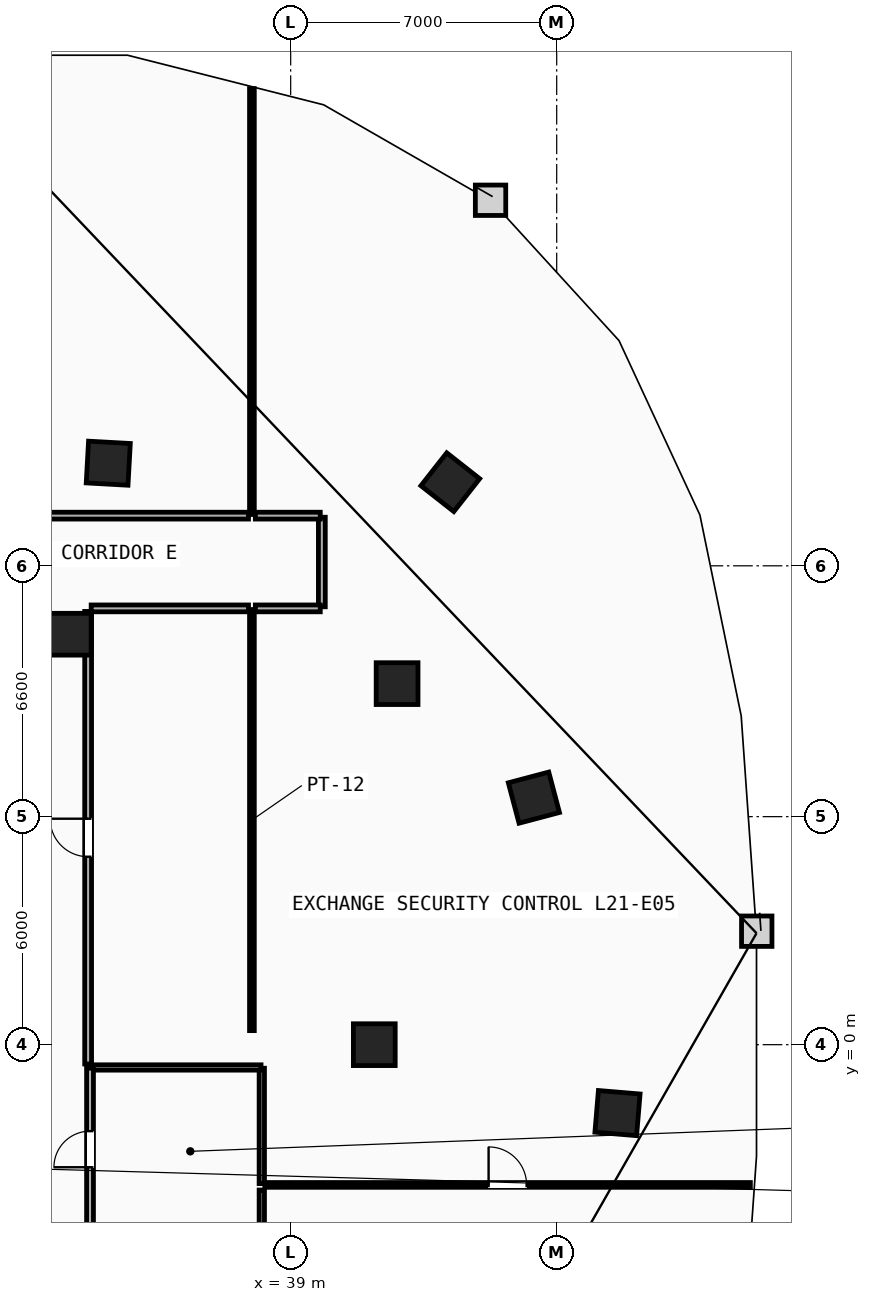
"""IFC4 building model, lengths in metres.
Left out: names, types, materials, properties, quantities, classifications, styles, units other than length and angle.
Written with IfcOpenShell. Run it as: python <this file> out.ifc"""

import sys

from ifc_helpers import new_model, si_unit, direction, frame, frame_2d, origin, origin_2d, place, context, subcontext, project, spatial, rectangle, extrude, element, fill, save


model = new_model("IFC4")
c1 = context("Model", 3, precision=1e-05, world=origin(), true_north=direction((0.0, 1.0)))
c2 = subcontext(c1, "Body", "Model", "MODEL_VIEW")
j1 = project(units=[si_unit("LENGTHUNIT", "METRE"), si_unit("PLANEANGLEUNIT", "RADIAN")], contexts=[c1])
p1 = place(None, origin())
s1 = spatial("IfcSite", under=j1, at=p1, CompositionType="ELEMENT")
p2 = place(p1, origin())
s2 = spatial("IfcBuilding", under=s1, at=p2, CompositionType="ELEMENT")
p3 = place(p2, frame((0.0, 0.0, 85.4)))
s3 = spatial("IfcBuildingStorey", under=s2, at=p3, CompositionType="ELEMENT", Elevation=85.4)
for number, where, z_axis, x_axis in (
    (1, (41.2, 0.0, 0.0), (0.0, 0.0, 1.0), (1.0, 0.0, 0.0)),
    (2, (41.8, 9.5, 0.0), (0.0, 0.0, 1.0), (1.0, 0.0, 0.0)),
    (3, (33.2, 10.8, 0.0), (0.0, 0.0, 1.0), (1.0, 0.0, 0.0)),
    (4, (47.6, -1.8, 0.0), (0.0, 0.0, 1.0), (0.084, 0.997, 0.0)),
    (5, (45.4, 6.5, 0.0), (0.0, 0.0, 1.0), (-0.256, 0.967, 0.0)),
    (6, (43.2, 14.8, 0.0), (0.0, 0.0, 1.0), (-0.786, 0.618, 0.0)),
    (7, (34.2, 15.3, 0.0), (0.0, 0.0, 1.0), (-0.998, 0.055, 0.0)),
):
    element("IfcColumn", number, at=place(p3, frame(where, z_axis=z_axis, x_axis=x_axis)), inside=s3, PredefinedType="COLUMN", context=c2, shape_type="SweptSolid", body=[
        extrude(rectangle(XDim=1.1, YDim=1.1, at=origin_2d()), origin(), (0.0, 0.0, 1.0), 3.6),
    ])
p4 = place(p3, frame((38.24, -4.895, 0.0), z_axis=(0.0, 0.0, 1.0), x_axis=(0.0, 1.0, 0.0)))
e8 = element("IfcWall", 8, at=p4, inside=s3, PredefinedType="PARTITIONING", context=c2, shape_type="SweptSolid", body=[
    extrude(rectangle(XDim=1.07, YDim=0.14, at=frame_2d((0.535, 0.0))), origin(), (0.0, 0.0, 1.0), 3.3),
])
p5 = place(p3, frame((38.24, -3.655, 0.0), z_axis=(0.0, 0.0, 1.0), x_axis=(0.0, 1.0, 0.0)))
e9 = element("IfcWall", 9, at=p5, inside=s3, PredefinedType="PARTITIONING", context=c2, shape_type="SweptSolid", body=[
    extrude(rectangle(XDim=3.035, YDim=0.14, at=frame_2d((1.518, 0.0))), origin(), (0.0, 0.0, 1.0), 3.3),
])
p6 = place(p3, frame((33.74, -0.6, 0.0), z_axis=(0.0, 0.0, 1.0), x_axis=(1.0, 0.0, 0.0)))
e10 = element("IfcWall", 10, at=p6, inside=s3, PredefinedType="PARTITIONING", context=c2, shape_type="SweptSolid", body=[
    extrude(rectangle(XDim=4.48, YDim=0.14, at=frame_2d((2.24, 0.0))), origin(), (0.0, 0.0, 1.0), 3.3),
])
p7 = place(p3, frame((33.72, -4.88, 0.0), z_axis=(0.0, 0.0, 1.0), x_axis=(0.0, 1.0, 0.0)))
e11 = element("IfcWall", 11, at=p7, inside=s3, PredefinedType="PARTITIONING", context=c2, shape_type="SweptSolid", body=[
    extrude(rectangle(XDim=4.26, YDim=0.18, at=frame_2d((2.13, 0.0))), origin(), (0.0, 0.0, 1.0), 3.3),
])
p8 = place(p7, frame((1.655, 0.0, 0.0)))
e12 = element("IfcOpeningElement", 12, at=p8, cuts=e11, PredefinedType="OPENING", context=c2, shape_type="SweptSolid", body=[
    extrude(rectangle(XDim=0.95, YDim=2.1, at=frame_2d((0.475, 1.05))), frame((0.0, 0.1, 0.0), z_axis=(0.0, -1.0, 0.0), x_axis=(1.0, 0.0, 0.0)), (0.0, 0.0, 1.0), 0.2),
])
p9 = place(p3, frame((37.98, 0.37, 0.0), z_axis=(0.0, 0.0, 1.0), x_axis=(0.0, 1.0, 0.0)))
e13 = element("IfcWall", 13, at=p9, inside=s3, PredefinedType="PARTITIONING", context=c2, shape_type="SweptSolid", body=[
    extrude(rectangle(XDim=11.08, YDim=0.125, at=frame_2d((5.54, 0.0))), origin(), (0.0, 0.0, 1.0), 3.3),
])
p10 = place(p3, frame((37.98, 13.95, 0.0), z_axis=(0.0, 0.0, 1.0), x_axis=(0.0, 1.0, 0.0)))
e14 = element("IfcWall", 14, at=p10, inside=s3, PredefinedType="PARTITIONING", context=c2, shape_type="SweptSolid", body=[
    extrude(rectangle(XDim=11.207, YDim=0.125, at=frame_2d((5.603, 0.0))), origin(), (0.0, 0.0, 1.0), 3.3),
])
p11 = place(p3, frame((37.89, 13.92, 0.0), z_axis=(0.0, 0.0, 1.0), x_axis=(-1.0, 0.0, 0.0)))
e15 = element("IfcWall", 15, at=p11, inside=s3, PredefinedType="PARTITIONING", context=c2, shape_type="SweptSolid", body=[
    extrude(rectangle(XDim=12.668, YDim=0.18, at=frame_2d((6.334, 0.0))), origin(), (0.0, 0.0, 1.0), 3.3),
])
p12 = place(p3, frame((33.67, -0.509, 0.0), z_axis=(0.0, 0.0, 1.0), x_axis=(0.0, 1.0, 0.0)))
e16 = element("IfcWall", 16, at=p12, inside=s3, PredefinedType="PARTITIONING", context=c2, shape_type="SweptSolid", body=[
    extrude(rectangle(XDim=11.908, YDim=0.18, at=frame_2d((5.954, 0.0))), origin(), (0.0, 0.0, 1.0), 3.3),
])
p13 = place(p12, frame((5.454, 0.0, 0.0)))
e17 = element("IfcOpeningElement", 17, at=p13, cuts=e16, PredefinedType="OPENING", context=c2, shape_type="SweptSolid", body=[
    extrude(rectangle(XDim=1.0, YDim=2.15, at=frame_2d((0.5, 1.075))), frame((0.0, 0.1, 0.0), z_axis=(0.0, -1.0, 0.0), x_axis=(1.0, 0.0, 0.0)), (0.0, 0.0, 1.0), 0.2),
])
p14 = place(p3, frame((33.75, 11.48, 0.0), z_axis=(0.0, 0.0, 1.0), x_axis=(1.0, 0.0, 0.0)))
e18 = element("IfcWall", 18, at=p14, inside=s3, PredefinedType="PARTITIONING", context=c2, shape_type="SweptSolid", body=[
    extrude(rectangle(XDim=4.14, YDim=0.18, at=frame_2d((2.07, 0.0))), origin(), (0.0, 0.0, 1.0), 3.3),
])
p15 = place(p3, frame((39.82, 11.521, 0.0), z_axis=(0.0, 0.0, 1.0), x_axis=(0.0, 1.0, 0.0)))
e19 = element("IfcWall", 19, at=p15, inside=s3, PredefinedType="PARTITIONING", context=c2, shape_type="SweptSolid", body=[
    extrude(rectangle(XDim=2.357, YDim=0.18, at=frame_2d((1.178, 0.0))), origin(), (0.0, 0.0, 1.0), 3.3),
])
for number, where, z_axis, x_axis in (
    (20, (38.07, 11.48, 0.0), (0.0, 0.0, 1.0), (1.0, 0.0, 0.0)),
    (21, (39.779, 13.92, 0.0), (0.0, 0.0, 1.0), (-1.0, 0.0, 0.0)),
):
    element("IfcWall", number, at=place(p3, frame(where, z_axis=z_axis, x_axis=x_axis)), inside=s3, PredefinedType="PARTITIONING", context=c2, shape_type="SweptSolid", body=[
        extrude(rectangle(XDim=1.708, YDim=0.18, at=frame_2d((0.854, 0.0))), origin(), (0.0, 0.0, 1.0), 3.3),
    ])
p16 = place(p3, frame((38.32, -3.69, 0.0), z_axis=(0.0, 0.0, 1.0), x_axis=(1.0, 0.0, 0.0)))
e22 = element("IfcWall", 22, at=p16, inside=s3, PredefinedType="PARTITIONING", context=c2, shape_type="SweptSolid", body=[
    extrude(rectangle(XDim=12.776, YDim=0.125, at=frame_2d((6.388, 0.0))), origin(), (0.0, 0.0, 1.0), 3.3),
])
p17 = place(p16, frame((5.888, 0.0, 0.0)))
e23 = element("IfcOpeningElement", 23, at=p17, cuts=e22, PredefinedType="OPENING", context=c2, shape_type="SweptSolid", body=[
    extrude(rectangle(XDim=1.0, YDim=2.15, at=frame_2d((0.5, 1.075))), frame((0.0, 0.073, 0.0), z_axis=(0.0, -1.0, 0.0), x_axis=(1.0, 0.0, 0.0)), (0.0, 0.0, 1.0), 0.145),
])
p18 = place(p17, origin())
e24 = element("IfcDoor", 24, at=p18, inside=s3, OperationType="SINGLE_SWING_LEFT", PredefinedType="DOOR", context=c2, shape_type="SweptSolid", body=[
    extrude(rectangle(XDim=1.0, YDim=2.15, at=frame_2d((0.5, 1.075))), frame((0.0, 0.025, 0.0), z_axis=(0.0, -1.0, 0.0), x_axis=(1.0, 0.0, 0.0)), (0.0, 0.0, 1.0), 0.05),
])
fill(e23, e24)
p19 = place(p13, origin())
e25 = element("IfcDoor", 25, at=p19, inside=s3, OperationType="SINGLE_SWING_RIGHT", PredefinedType="DOOR", context=c2, shape_type="SweptSolid", body=[
    extrude(rectangle(XDim=1.0, YDim=2.15, at=frame_2d((0.5, 1.075))), frame((0.0, 0.025, 0.0), z_axis=(0.0, -1.0, 0.0), x_axis=(1.0, 0.0, 0.0)), (0.0, 0.0, 1.0), 0.05),
])
fill(e17, e25)
p20 = place(p8, origin())
e26 = element("IfcDoor", 26, at=p20, inside=s3, OperationType="SINGLE_SWING_LEFT", PredefinedType="DOOR", context=c2, shape_type="SweptSolid", body=[
    extrude(rectangle(XDim=0.95, YDim=2.1, at=frame_2d((0.475, 1.05))), frame((0.0, 0.025, 0.0), z_axis=(0.0, -1.0, 0.0), x_axis=(1.0, 0.0, 0.0)), (0.0, 0.0, 1.0), 0.05),
])
fill(e12, e26)
save(model, sys.argv[1])
